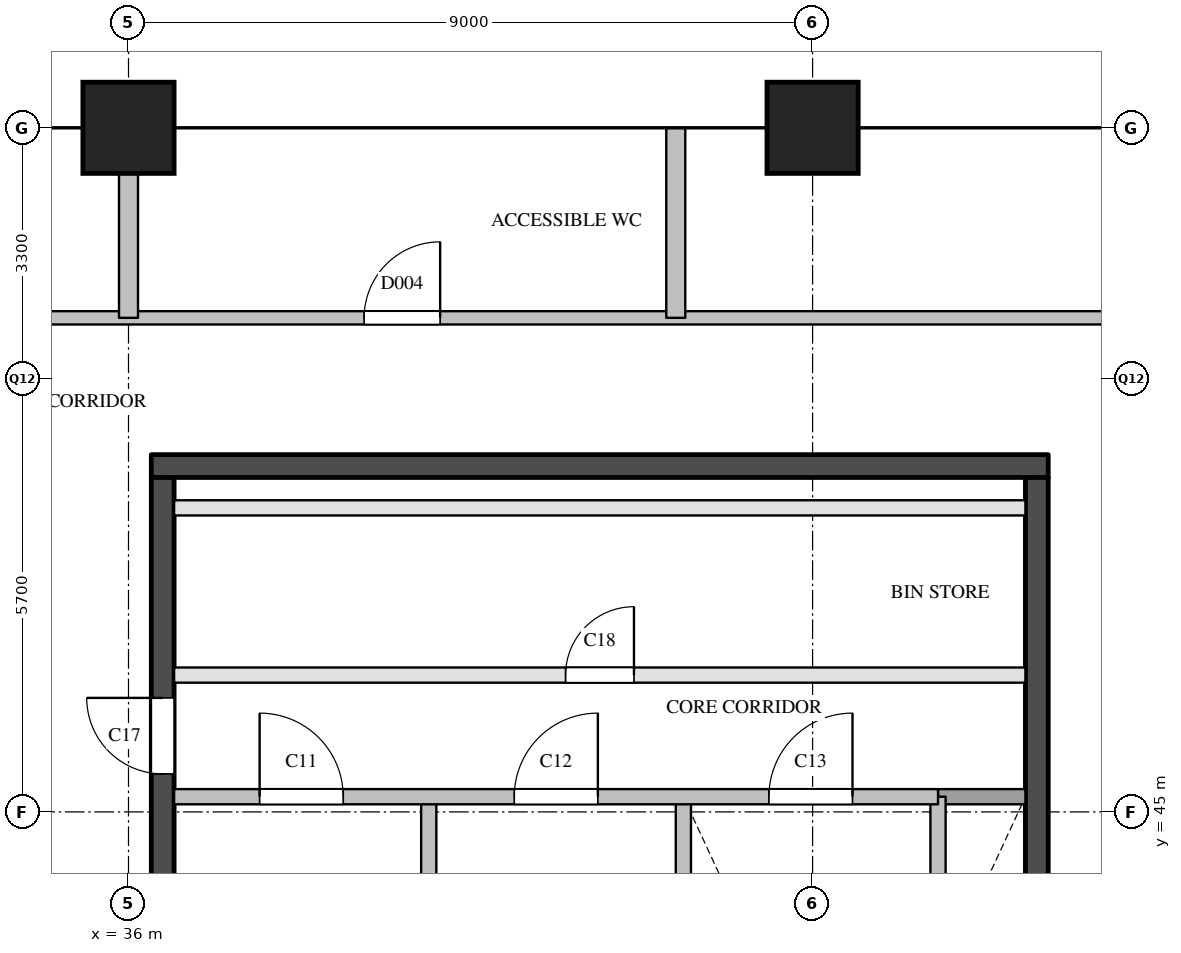
"""IFC4 building model, lengths in metres.
Left out: names, types, materials, properties, quantities, classifications, styles, units other than length and angle.
Written with IfcOpenShell. Run it as: python <this file> out.ifc"""

import sys

from ifc_helpers import new_model, si_unit, direction, frame, frame_2d, origin, origin_2d, place, context, subcontext, project, spatial, rectangle, extrude, element, fill, save


model = new_model("IFC4")
c1 = context("Model", 3, precision=1e-05, world=origin(), true_north=direction((0.0, 1.0)))
c2 = subcontext(c1, "Body", "Model", "MODEL_VIEW")
j1 = project(units=[si_unit("LENGTHUNIT", "METRE"), si_unit("PLANEANGLEUNIT", "RADIAN")], contexts=[c1])
p1 = place(None, origin())
s1 = spatial("IfcSite", under=j1, at=p1, CompositionType="ELEMENT")
p2 = place(p1, origin())
s2 = spatial("IfcBuilding", under=s1, at=p2, CompositionType="ELEMENT")
p3 = place(p2, frame((0.0, 0.0, 305.1)))
s3 = spatial("IfcBuildingStorey", under=s2, at=p3, CompositionType="ELEMENT", Elevation=305.1)
for number, where, z_axis, x_axis in (
    (1, (36.0, 54.0, 0.0), (0.0, 0.0, 1.0), (1.0, 0.0, 0.0)),
    (2, (45.0, 54.0, 0.0), (0.0, 0.0, 1.0), (1.0, 0.0, 0.0)),
):
    element("IfcColumn", number, at=place(p3, frame(where, z_axis=z_axis, x_axis=x_axis)), inside=s3, PredefinedType="COLUMN", context=c2, shape_type="SweptSolid", body=[
        extrude(rectangle(XDim=1.2, YDim=1.2, at=origin_2d()), origin(), (0.0, 0.0, 1.0), 3.9),
    ])
p4 = place(p3, frame((36.3, 49.55, 0.0), z_axis=(0.0, 0.0, 1.0), x_axis=(1.0, 0.0, 0.0)))
e3 = element("IfcWall", 3, at=p4, inside=s3, PredefinedType="SHEAR", context=c2, shape_type="SweptSolid", body=[
    extrude(rectangle(XDim=11.8, YDim=0.3, at=frame_2d((5.9, 0.0))), origin(), (0.0, 0.0, 1.0), 3.6),
])
p5 = place(p3, frame((36.45, 29.1, 0.0), z_axis=(0.0, 0.0, 1.0), x_axis=(0.0, 1.0, 0.0)))
e4 = element("IfcWall", 4, at=p5, inside=s3, PredefinedType="SHEAR", context=c2, shape_type="SweptSolid", body=[
    extrude(rectangle(XDim=20.3, YDim=0.3, at=frame_2d((10.15, 0.0))), origin(), (0.0, 0.0, 1.0), 3.6),
])
p6 = place(p5, frame((3.6, 0.0, 0.0)))
e5 = element("IfcOpeningElement", 5, at=p6, cuts=e4, PredefinedType="OPENING", context=c2, shape_type="SweptSolid", body=[
    extrude(rectangle(XDim=1.8, YDim=2.1, at=frame_2d((0.9, 1.05))), frame((0.0, 0.16, 0.0), z_axis=(0.0, -1.0, 0.0), x_axis=(1.0, 0.0, 0.0)), (0.0, 0.0, 1.0), 0.32),
])
p7 = place(p5, frame((16.4, 0.0, 0.0)))
e6 = element("IfcOpeningElement", 6, at=p7, cuts=e4, PredefinedType="OPENING", context=c2, shape_type="SweptSolid", body=[
    extrude(rectangle(XDim=1.0, YDim=2.1, at=frame_2d((0.5, 1.05))), frame((0.0, 0.16, 0.0), z_axis=(0.0, -1.0, 0.0), x_axis=(1.0, 0.0, 0.0)), (0.0, 0.0, 1.0), 0.32),
])
p8 = place(p3, frame((47.95, 29.1, 0.0), z_axis=(0.0, 0.0, 1.0), x_axis=(0.0, 1.0, 0.0)))
e7 = element("IfcWall", 7, at=p8, inside=s3, PredefinedType="SHEAR", context=c2, shape_type="SweptSolid", body=[
    extrude(rectangle(XDim=20.3, YDim=0.3, at=frame_2d((10.15, 0.0))), origin(), (0.0, 0.0, 1.0), 3.6),
])
p9 = place(p8, frame((12.5, 0.0, 0.0)))
e8 = element("IfcOpeningElement", 8, at=p9, cuts=e7, PredefinedType="OPENING", context=c2, shape_type="SweptSolid", body=[
    extrude(rectangle(XDim=0.7, YDim=2.1, at=frame_2d((0.35, 1.05))), frame((0.0, 0.16, 0.0), z_axis=(0.0, -1.0, 0.0), x_axis=(1.0, 0.0, 0.0)), (0.0, 0.0, 1.0), 0.32),
])
p10 = place(p8, frame((3.9, 0.0, 0.0)))
e9 = element("IfcOpeningElement", 9, at=p10, cuts=e7, PredefinedType="OPENING", context=c2, shape_type="SweptSolid", body=[
    extrude(rectangle(XDim=1.8, YDim=2.1, at=frame_2d((0.9, 1.05))), frame((0.0, 0.16, 0.0), z_axis=(0.0, -1.0, 0.0), x_axis=(1.0, 0.0, 0.0)), (0.0, 0.0, 1.0), 0.32),
])
for number, where, z_axis, x_axis in (
    (10, (39.95, 40.78, 0.0), (0.0, 0.0, 1.0), (0.0, 1.0, 0.0)),
    (11, (43.3, 40.78, 0.0), (0.0, 0.0, 1.0), (0.0, 1.0, 0.0)),
    (12, (46.65, 40.78, 0.0), (0.0, 0.0, 1.0), (0.0, 1.0, 0.0)),
):
    element("IfcWall", number, at=place(p3, frame(where, z_axis=z_axis, x_axis=x_axis)), inside=s3, PredefinedType="SOLIDWALL", context=c2, shape_type="SweptSolid", body=[
        extrude(rectangle(XDim=4.42, YDim=0.2, at=frame_2d((2.21, 0.0))), origin(), (0.0, 0.0, 1.0), 3.6),
    ])
p11 = place(p3, frame((46.65, 45.2, 0.0), z_axis=(0.0, 0.0, 1.0), x_axis=(1.0, 0.0, 0.0)))
e13 = element("IfcWall", 13, at=p11, inside=s3, PredefinedType="SOLIDWALL", context=c2, shape_type="SweptSolid", body=[
    extrude(rectangle(XDim=1.15, YDim=0.2, at=frame_2d((0.575, 0.0))), origin(), (0.0, 0.0, 1.0), 3.6),
])
p12 = place(p3, frame((36.6, 45.2, 0.0), z_axis=(0.0, 0.0, 1.0), x_axis=(1.0, 0.0, 0.0)))
e14 = element("IfcWall", 14, at=p12, inside=s3, PredefinedType="SOLIDWALL", context=c2, shape_type="SweptSolid", body=[
    extrude(rectangle(XDim=10.05, YDim=0.2, at=frame_2d((5.025, 0.0))), origin(), (0.0, 0.0, 1.0), 3.6),
])
p13 = place(p12, frame((1.125, 0.0, 0.0)))
e15 = element("IfcOpeningElement", 15, at=p13, cuts=e14, PredefinedType="OPENING", context=c2, shape_type="SweptSolid", body=[
    extrude(rectangle(XDim=1.1, YDim=2.1, at=frame_2d((0.55, 1.05))), frame((0.0, 0.11, 0.0), z_axis=(0.0, -1.0, 0.0), x_axis=(1.0, 0.0, 0.0)), (0.0, 0.0, 1.0), 0.22),
])
p14 = place(p12, frame((4.475, 0.0, 0.0)))
e16 = element("IfcOpeningElement", 16, at=p14, cuts=e14, PredefinedType="OPENING", context=c2, shape_type="SweptSolid", body=[
    extrude(rectangle(XDim=1.1, YDim=2.1, at=frame_2d((0.55, 1.05))), frame((0.0, 0.11, 0.0), z_axis=(0.0, -1.0, 0.0), x_axis=(1.0, 0.0, 0.0)), (0.0, 0.0, 1.0), 0.22),
])
p15 = place(p12, frame((7.825, 0.0, 0.0)))
e17 = element("IfcOpeningElement", 17, at=p15, cuts=e14, PredefinedType="OPENING", context=c2, shape_type="SweptSolid", body=[
    extrude(rectangle(XDim=1.1, YDim=2.1, at=frame_2d((0.55, 1.05))), frame((0.0, 0.11, 0.0), z_axis=(0.0, -1.0, 0.0), x_axis=(1.0, 0.0, 0.0)), (0.0, 0.0, 1.0), 0.22),
])
p16 = place(p3, frame((36.6, 46.8, 0.0), z_axis=(0.0, 0.0, 1.0), x_axis=(1.0, 0.0, 0.0)))
e18 = element("IfcWall", 18, at=p16, inside=s3, PredefinedType="PARTITIONING", context=c2, shape_type="SweptSolid", body=[
    extrude(rectangle(XDim=11.2, YDim=0.2, at=frame_2d((5.6, 0.0))), origin(), (0.0, 0.0, 1.0), 3.6),
])
p17 = place(p16, frame((5.15, 0.0, 0.0)))
e19 = element("IfcOpeningElement", 19, at=p17, cuts=e18, PredefinedType="OPENING", context=c2, shape_type="SweptSolid", body=[
    extrude(rectangle(XDim=0.9, YDim=2.1, at=frame_2d((0.45, 1.05))), frame((0.0, 0.11, 0.0), z_axis=(0.0, -1.0, 0.0), x_axis=(1.0, 0.0, 0.0)), (0.0, 0.0, 1.0), 0.22),
])
p18 = place(p3, frame((36.6, 49.0, 0.0), z_axis=(0.0, 0.0, 1.0), x_axis=(1.0, 0.0, 0.0)))
e20 = element("IfcWall", 20, at=p18, inside=s3, PredefinedType="PARTITIONING", context=c2, shape_type="SweptSolid", body=[
    extrude(rectangle(XDim=11.2, YDim=0.2, at=frame_2d((5.6, 0.0))), origin(), (0.0, 0.0, 1.0), 3.6),
])
p19 = place(p3, frame((34.5, 51.5, 0.0), z_axis=(0.0, 0.0, 1.0), x_axis=(1.0, 0.0, 0.0)))
e21 = element("IfcWall", 21, at=p19, inside=s3, PredefinedType="PARTITIONING", context=c2, shape_type="SweptSolid", body=[
    extrude(rectangle(XDim=15.4, YDim=0.175, at=frame_2d((7.7, 0.0))), origin(), (0.0, 0.0, 1.0), 3.6),
])
p20 = place(p19, frame((4.6, 0.0, 0.0)))
e22 = element("IfcOpeningElement", 22, at=p20, cuts=e21, PredefinedType="OPENING", context=c2, shape_type="SweptSolid", body=[
    extrude(rectangle(XDim=1.0, YDim=2.1, at=frame_2d((0.5, 1.05))), frame((0.0, 0.097, 0.0), z_axis=(0.0, -1.0, 0.0), x_axis=(1.0, 0.0, 0.0)), (0.0, 0.0, 1.0), 0.195),
])
p21 = place(p3, frame((36.0, 51.5, 0.0), z_axis=(0.0, 0.0, 1.0), x_axis=(0.0, 1.0, 0.0)))
e23 = element("IfcWall", 23, at=p21, inside=s3, PredefinedType="PARTITIONING", context=c2, shape_type="SweptSolid", body=[
    extrude(rectangle(XDim=2.5, YDim=0.25, at=frame_2d((1.25, 0.0))), origin(), (0.0, 0.0, 1.0), 3.6),
])
p22 = place(p3, frame((43.2, 51.5, 0.0), z_axis=(0.0, 0.0, 1.0), x_axis=(0.0, 1.0, 0.0)))
e24 = element("IfcWall", 24, at=p22, inside=s3, PredefinedType="PARTITIONING", context=c2, shape_type="SweptSolid", body=[
    extrude(rectangle(XDim=2.5, YDim=0.25, at=frame_2d((1.25, 0.0))), origin(), (0.0, 0.0, 1.0), 2.6),
])
p23 = place(p13, origin())
e25 = element("IfcDoor", 25, at=p23, inside=s3, OperationType="SINGLE_SWING_LEFT", PredefinedType="DOOR", context=c2, shape_type="SweptSolid", body=[
    extrude(rectangle(XDim=1.1, YDim=2.1, at=frame_2d((0.55, 1.05))), frame((0.0, 0.025, 0.0), z_axis=(0.0, -1.0, 0.0), x_axis=(1.0, 0.0, 0.0)), (0.0, 0.0, 1.0), 0.05),
])
fill(e15, e25)
p24 = place(p14, origin())
e26 = element("IfcDoor", 26, at=p24, inside=s3, OperationType="SINGLE_SWING_RIGHT", PredefinedType="DOOR", context=c2, shape_type="SweptSolid", body=[
    extrude(rectangle(XDim=1.1, YDim=2.1, at=frame_2d((0.55, 1.05))), frame((0.0, 0.025, 0.0), z_axis=(0.0, -1.0, 0.0), x_axis=(1.0, 0.0, 0.0)), (0.0, 0.0, 1.0), 0.05),
])
fill(e16, e26)
p25 = place(p15, origin())
e27 = element("IfcDoor", 27, at=p25, inside=s3, OperationType="SINGLE_SWING_RIGHT", PredefinedType="DOOR", context=c2, shape_type="SweptSolid", body=[
    extrude(rectangle(XDim=1.1, YDim=2.1, at=frame_2d((0.55, 1.05))), frame((0.0, 0.025, 0.0), z_axis=(0.0, -1.0, 0.0), x_axis=(1.0, 0.0, 0.0)), (0.0, 0.0, 1.0), 0.05),
])
fill(e17, e27)
p26 = place(p7, origin())
e28 = element("IfcDoor", 28, at=p26, inside=s3, OperationType="SINGLE_SWING_RIGHT", PredefinedType="DOOR", context=c2, shape_type="SweptSolid", body=[
    extrude(rectangle(XDim=1.0, YDim=2.1, at=frame_2d((0.5, 1.05))), frame((0.0, 0.025, 0.0), z_axis=(0.0, -1.0, 0.0), x_axis=(1.0, 0.0, 0.0)), (0.0, 0.0, 1.0), 0.05),
])
fill(e6, e28)
p27 = place(p17, origin())
e29 = element("IfcDoor", 29, at=p27, inside=s3, OperationType="SINGLE_SWING_RIGHT", PredefinedType="DOOR", context=c2, shape_type="SweptSolid", body=[
    extrude(rectangle(XDim=0.9, YDim=2.1, at=frame_2d((0.45, 1.05))), frame((0.0, 0.025, 0.0), z_axis=(0.0, -1.0, 0.0), x_axis=(1.0, 0.0, 0.0)), (0.0, 0.0, 1.0), 0.05),
])
fill(e19, e29)
p28 = place(p20, origin())
e30 = element("IfcDoor", 30, at=p28, inside=s3, OperationType="SINGLE_SWING_RIGHT", PredefinedType="DOOR", context=c2, shape_type="SweptSolid", body=[
    extrude(rectangle(XDim=1.0, YDim=2.1, at=frame_2d((0.5, 1.05))), frame((0.0, 0.025, 0.0), z_axis=(0.0, -1.0, 0.0), x_axis=(1.0, 0.0, 0.0)), (0.0, 0.0, 1.0), 0.05),
])
fill(e22, e30)
save(model, sys.argv[1])
